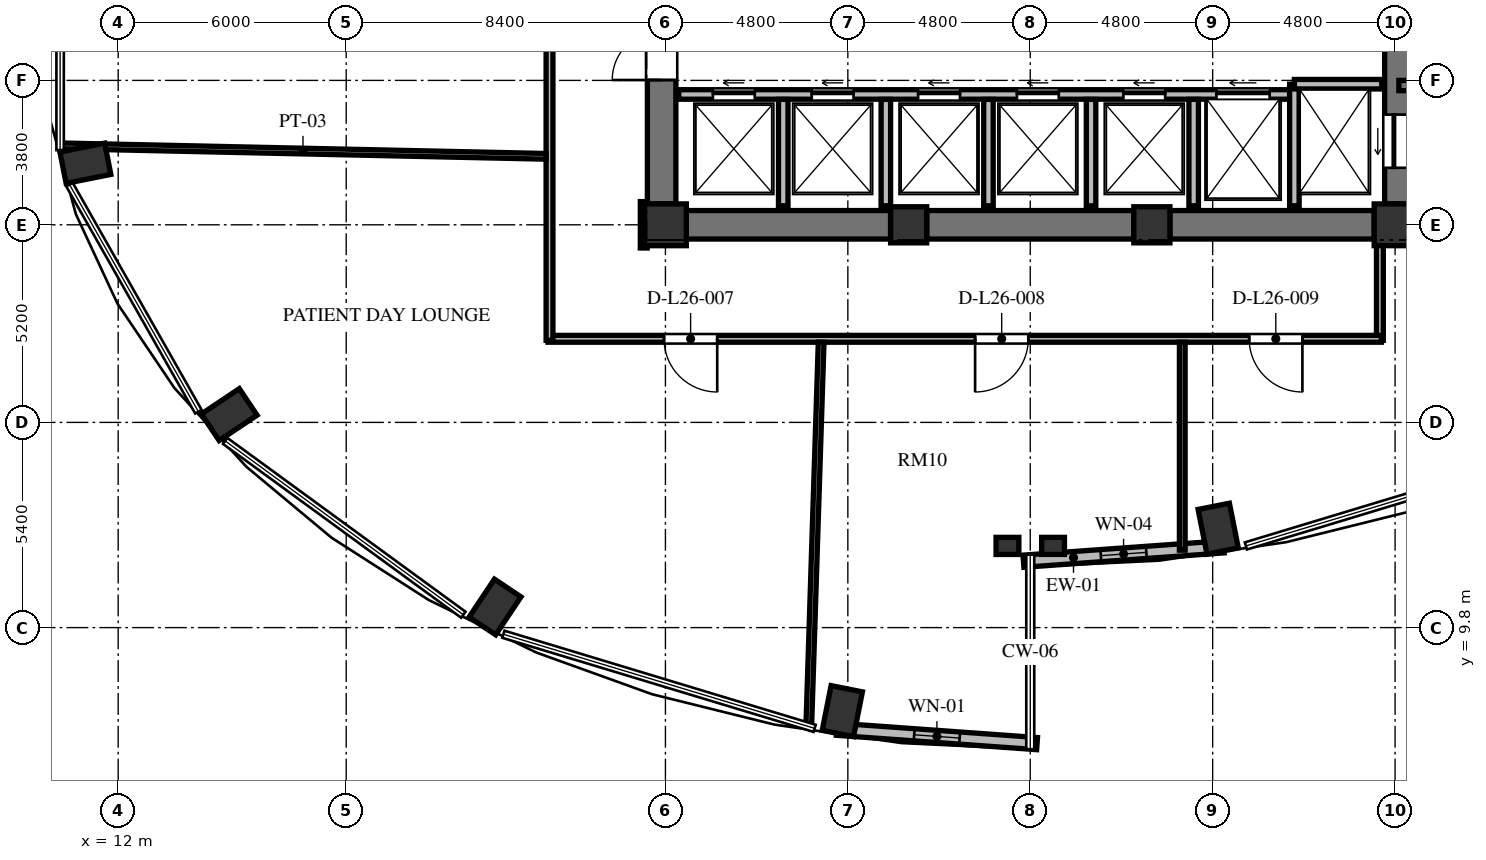
"""IFC4 building model, lengths in metres.
Left out: names, types, materials, properties, quantities, classifications, styles, units other than length and angle.
Written with IfcOpenShell. Run it as: python <this file> out.ifc"""

import sys

from ifc_helpers import new_model, si_unit, direction, frame, frame_2d, origin, origin_2d, place, context, subcontext, project, spatial, rectangle, extrude, element, fill, save


model = new_model("IFC4")
c1 = context("Model", 3, precision=1e-05, world=origin(), true_north=direction((0.0, 1.0)))
c2 = subcontext(c1, "Body", "Model", "MODEL_VIEW")
j1 = project(units=[si_unit("LENGTHUNIT", "METRE"), si_unit("PLANEANGLEUNIT", "RADIAN")], contexts=[c1])
p1 = place(None, origin())
s1 = spatial("IfcSite", under=j1, at=p1, CompositionType="ELEMENT")
p2 = place(p1, origin())
s2 = spatial("IfcBuilding", under=s1, at=p2, CompositionType="ELEMENT")
p3 = place(p2, frame((0.0, 0.0, 103.632)))
s3 = spatial("IfcBuildingStorey", under=s2, at=p3, CompositionType="ELEMENT", Elevation=103.632)
for number, where, z_axis, x_axis in (
    (1, (40.946, 12.403, 0.0), (0.0, 0.0, 1.0), (0.195, -0.981, 0.0)),
    (2, (11.137, 22.02, 0.0), (0.0, 0.0, 1.0), (-0.981, -0.195, 0.0)),
    (3, (14.922, 15.405, 0.0), (0.0, 0.0, 1.0), (-0.831, -0.556, 0.0)),
    (4, (21.916, 10.343, 0.0), (0.0, 0.0, 1.0), (-0.556, -0.831, 0.0)),
    (5, (31.054, 7.603, 0.0), (0.0, 0.0, 1.0), (-0.195, -0.981, 0.0)),
):
    element("IfcColumn", number, at=place(p3, frame(where, z_axis=z_axis, x_axis=x_axis)), inside=s3, PredefinedType="COLUMN", context=c2, shape_type="SweptSolid", body=[
        extrude(rectangle(XDim=1.2, YDim=0.84, at=origin_2d()), origin(), (0.0, 0.0, 1.0), 3.648),
    ])
p4 = place(p3, frame((26.4, 20.4, 0.0), z_axis=(0.0, 0.0, 1.0), x_axis=(1.0, 0.0, 0.0)))
e6 = element("IfcColumn", 6, at=p4, inside=s3, PredefinedType="COLUMN", context=c2, shape_type="SweptSolid", body=[
    extrude(rectangle(XDim=1.1, YDim=1.1, at=origin_2d()), origin(), (0.0, 0.0, 1.0), 3.648),
])
for number, where, z_axis, x_axis in (
    (7, (32.8, 20.4, 0.0), (0.0, 0.0, 1.0), (1.0, 0.0, 0.0)),
    (8, (39.2, 20.4, 0.0), (0.0, 0.0, 1.0), (1.0, 0.0, 0.0)),
):
    element("IfcColumn", number, at=place(p3, frame(where, z_axis=z_axis, x_axis=x_axis)), inside=s3, PredefinedType="COLUMN", context=c2, shape_type="SweptSolid", body=[
        extrude(rectangle(XDim=0.95, YDim=0.95, at=origin_2d()), origin(), (0.0, 0.0, 1.0), 3.648),
    ])
p5 = place(p3, frame((45.6, 20.4, 0.0), z_axis=(0.0, 0.0, 1.0), x_axis=(1.0, 0.0, 0.0)))
e9 = element("IfcColumn", 9, at=p5, inside=s3, PredefinedType="COLUMN", context=c2, shape_type="SweptSolid", body=[
    extrude(rectangle(XDim=1.1, YDim=1.1, at=origin_2d()), origin(), (0.0, 0.0, 1.0), 3.648),
])
for number, where, z_axis, x_axis in (
    (10, (35.4, 11.95, 0.0), (0.0, 0.0, 1.0), (1.0, 0.0, 0.0)),
    (11, (36.6, 11.95, 0.0), (0.0, 0.0, 1.0), (1.0, 0.0, 0.0)),
):
    element("IfcColumn", number, at=place(p3, frame(where, z_axis=z_axis, x_axis=x_axis)), inside=s3, PredefinedType="PILASTER", context=c2, shape_type="SweptSolid", body=[
        extrude(rectangle(XDim=0.6, YDim=0.45, at=origin_2d()), origin(), (0.0, 0.0, 1.0), 3.648),
    ])
p6 = place(p3, frame((26.3, 20.95, 0.0), z_axis=(0.0, 0.0, 1.0), x_axis=(0.0, 1.0, 0.0)))
e12 = element("IfcWall", 12, at=p6, inside=s3, PredefinedType="SHEAR", context=c2, shape_type="SweptSolid", body=[
    extrude(rectangle(XDim=14.1, YDim=0.75, at=frame_2d((7.05, 0.0))), origin(), (0.0, 0.0, 1.0), 3.648),
])
p7 = place(p6, frame((6.5, 0.0, 0.0)))
e13 = element("IfcOpeningElement", 13, at=p7, cuts=e12, PredefinedType="OPENING", context=c2, shape_type="SweptSolid", body=[
    extrude(rectangle(XDim=1.2, YDim=2.15, at=frame_2d((0.6, 1.075))), frame((0.0, 0.385, 0.0), z_axis=(0.0, -1.0, 0.0), x_axis=(1.0, 0.0, 0.0)), (0.0, 0.0, 1.0), 0.77),
])
p8 = place(p6, frame((9.6, 0.0, 0.0)))
e14 = element("IfcOpeningElement", 14, at=p8, cuts=e12, PredefinedType="OPENING", context=c2, shape_type="SweptSolid", body=[
    extrude(rectangle(XDim=1.3, YDim=2.2, at=frame_2d((0.65, 1.1))), frame((0.0, 0.385, 0.0), z_axis=(0.0, -1.0, 0.0), x_axis=(1.0, 0.0, 0.0)), (0.0, 0.0, 1.0), 0.77),
])
p9 = place(p6, frame((3.26, 0.0, 0.0)))
e15 = element("IfcOpeningElement", 15, at=p9, cuts=e12, PredefinedType="OPENING", context=c2, shape_type="SweptSolid", body=[
    extrude(rectangle(XDim=1.3, YDim=2.2, at=frame_2d((0.65, 1.1))), frame((0.0, 0.385, 0.0), z_axis=(0.0, -1.0, 0.0), x_axis=(1.0, 0.0, 0.0)), (0.0, 0.0, 1.0), 0.77),
])
p10 = place(p3, frame((45.7, 20.95, 0.0), z_axis=(0.0, 0.0, 1.0), x_axis=(0.0, 1.0, 0.0)))
e16 = element("IfcWall", 16, at=p10, inside=s3, PredefinedType="SHEAR", context=c2, shape_type="SweptSolid", body=[
    extrude(rectangle(XDim=14.1, YDim=0.75, at=frame_2d((7.05, 0.0))), origin(), (0.0, 0.0, 1.0), 3.648),
])
p11 = place(p10, frame((11.75, 0.0, 0.0)))
e17 = element("IfcOpeningElement", 17, at=p11, cuts=e16, PredefinedType="OPENING", context=c2, shape_type="SweptSolid", body=[
    extrude(rectangle(XDim=1.4, YDim=2.3, at=frame_2d((0.7, 1.15))), frame((0.0, 0.385, 0.0), z_axis=(0.0, -1.0, 0.0), x_axis=(1.0, 0.0, 0.0)), (0.0, 0.0, 1.0), 0.77),
])
p12 = place(p10, frame((0.95, 0.0, 0.0)))
e18 = element("IfcOpeningElement", 18, at=p12, cuts=e16, PredefinedType="OPENING", context=c2, shape_type="SweptSolid", body=[
    extrude(rectangle(XDim=1.4, YDim=2.3, at=frame_2d((0.7, 1.15))), frame((0.0, 0.385, 0.0), z_axis=(0.0, -1.0, 0.0), x_axis=(1.0, 0.0, 0.0)), (0.0, 0.0, 1.0), 0.77),
])
p13 = place(p3, frame((26.95, 20.4, 0.0), z_axis=(0.0, 0.0, 1.0), x_axis=(1.0, 0.0, 0.0)))
e19 = element("IfcWall", 19, at=p13, inside=s3, PredefinedType="SHEAR", context=c2, shape_type="SweptSolid", body=[
    extrude(rectangle(XDim=5.375, YDim=0.75, at=frame_2d((2.688, 0.0))), origin(), (0.0, 0.0, 1.0), 3.648),
])
p14 = place(p3, frame((33.275, 20.4, 0.0), z_axis=(0.0, 0.0, 1.0), x_axis=(1.0, 0.0, 0.0)))
e20 = element("IfcWall", 20, at=p14, inside=s3, PredefinedType="SHEAR", context=c2, shape_type="SweptSolid", body=[
    extrude(rectangle(XDim=5.45, YDim=0.75, at=frame_2d((2.725, 0.0))), origin(), (0.0, 0.0, 1.0), 3.648),
])
p15 = place(p3, frame((39.675, 20.4, 0.0), z_axis=(0.0, 0.0, 1.0), x_axis=(1.0, 0.0, 0.0)))
e21 = element("IfcWall", 21, at=p15, inside=s3, PredefinedType="SHEAR", context=c2, shape_type="SweptSolid", body=[
    extrude(rectangle(XDim=5.375, YDim=0.75, at=frame_2d((2.688, 0.0))), origin(), (0.0, 0.0, 1.0), 3.648),
])
p16 = place(p3, frame((35.821, 11.547, 0.0), z_axis=(0.0, 0.0, 1.0), x_axis=(0.997432364291, 0.071614793619, 0.0)))
e22 = element("IfcWall", 22, at=p16, inside=s3, PredefinedType="SOLIDWALL", context=c2, shape_type="SweptSolid", body=[
    extrude(rectangle(XDim=5.284, YDim=0.32, at=frame_2d((2.642, 0.0))), origin(), (0.0, 0.0, 1.0), 3.428),
])
p17 = place(p16, frame((2.042, 0.0, 0.85)))
e23 = element("IfcOpeningElement", 23, at=p17, cuts=e22, PredefinedType="OPENING", context=c2, shape_type="SweptSolid", body=[
    extrude(rectangle(XDim=1.2, YDim=1.8, at=frame_2d((0.6, 0.9))), frame((0.0, 0.17, 0.0), z_axis=(0.0, -1.0, 0.0), x_axis=(1.0, 0.0, 0.0)), (0.0, 0.0, 1.0), 0.34),
])
p18 = place(p3, frame((30.909, 7.125, 0.0), z_axis=(0.0, 0.0, 1.0), x_axis=(0.997431890304, -0.071621394884, 0.0)))
e24 = element("IfcWall", 24, at=p18, inside=s3, PredefinedType="SOLIDWALL", context=c2, shape_type="SweptSolid", body=[
    extrude(rectangle(XDim=5.284, YDim=0.32, at=frame_2d((2.642, 0.0))), origin(), (0.0, 0.0, 1.0), 3.428),
])
p19 = place(p18, frame((2.042, 0.0, 0.85)))
e25 = element("IfcOpeningElement", 25, at=p19, cuts=e24, PredefinedType="OPENING", context=c2, shape_type="SweptSolid", body=[
    extrude(rectangle(XDim=1.2, YDim=2.2, at=frame_2d((0.6, 1.1))), frame((0.0, 0.17, 0.0), z_axis=(0.0, -1.0, 0.0), x_axis=(1.0, 0.0, 0.0)), (0.0, 0.0, 1.0), 0.34),
])
p20 = place(p3, frame((26.75, 23.83, 0.0), z_axis=(0.0, 0.0, 1.0), x_axis=(1.0, 0.0, 0.0)))
e26 = element("IfcWall", 26, at=p20, inside=s3, PredefinedType="SOLIDWALL", context=c2, shape_type="SweptSolid", body=[
    extrude(rectangle(XDim=16.2, YDim=0.25, at=frame_2d((8.1, 0.0))), origin(), (0.0, 0.0, 1.0), 3.428),
])
p21 = place(p20, frame((0.9, 0.0, 0.0)))
e27 = element("IfcOpeningElement", 27, at=p21, cuts=e26, PredefinedType="OPENING", context=c2, shape_type="SweptSolid", body=[
    extrude(rectangle(XDim=1.1, YDim=2.2, at=frame_2d((0.55, 1.1))), frame((0.0, 0.135, 0.0), z_axis=(0.0, -1.0, 0.0), x_axis=(1.0, 0.0, 0.0)), (0.0, 0.0, 1.0), 0.27),
])
p22 = place(p20, frame((3.5, 0.0, 0.0)))
e28 = element("IfcOpeningElement", 28, at=p22, cuts=e26, PredefinedType="OPENING", context=c2, shape_type="SweptSolid", body=[
    extrude(rectangle(XDim=1.1, YDim=2.2, at=frame_2d((0.55, 1.1))), frame((0.0, 0.135, 0.0), z_axis=(0.0, -1.0, 0.0), x_axis=(1.0, 0.0, 0.0)), (0.0, 0.0, 1.0), 0.27),
])
p23 = place(p20, frame((6.3, 0.0, 0.0)))
e29 = element("IfcOpeningElement", 29, at=p23, cuts=e26, PredefinedType="OPENING", context=c2, shape_type="SweptSolid", body=[
    extrude(rectangle(XDim=1.1, YDim=2.2, at=frame_2d((0.55, 1.1))), frame((0.0, 0.135, 0.0), z_axis=(0.0, -1.0, 0.0), x_axis=(1.0, 0.0, 0.0)), (0.0, 0.0, 1.0), 0.27),
])
p24 = place(p20, frame((8.9, 0.0, 0.0)))
e30 = element("IfcOpeningElement", 30, at=p24, cuts=e26, PredefinedType="OPENING", context=c2, shape_type="SweptSolid", body=[
    extrude(rectangle(XDim=1.1, YDim=2.2, at=frame_2d((0.55, 1.1))), frame((0.0, 0.135, 0.0), z_axis=(0.0, -1.0, 0.0), x_axis=(1.0, 0.0, 0.0)), (0.0, 0.0, 1.0), 0.27),
])
p25 = place(p20, frame((11.7, 0.0, 0.0)))
e31 = element("IfcOpeningElement", 31, at=p25, cuts=e26, PredefinedType="OPENING", context=c2, shape_type="SweptSolid", body=[
    extrude(rectangle(XDim=1.1, YDim=2.2, at=frame_2d((0.55, 1.1))), frame((0.0, 0.135, 0.0), z_axis=(0.0, -1.0, 0.0), x_axis=(1.0, 0.0, 0.0)), (0.0, 0.0, 1.0), 0.27),
])
p26 = place(p20, frame((14.15, 0.0, 0.0)))
e32 = element("IfcOpeningElement", 32, at=p26, cuts=e26, PredefinedType="OPENING", context=c2, shape_type="SweptSolid", body=[
    extrude(rectangle(XDim=1.4, YDim=2.3, at=frame_2d((0.7, 1.15))), frame((0.0, 0.135, 0.0), z_axis=(0.0, -1.0, 0.0), x_axis=(1.0, 0.0, 0.0)), (0.0, 0.0, 1.0), 0.27),
])
p27 = place(p3, frame((42.95, 20.9, 0.0), z_axis=(0.0, 0.0, 1.0), x_axis=(0.0, 1.0, 0.0)))
e33 = element("IfcWall", 33, at=p27, inside=s3, PredefinedType="SOLIDWALL", context=c2, shape_type="SweptSolid", body=[
    extrude(rectangle(XDim=3.2, YDim=0.25, at=frame_2d((1.6, 0.0))), origin(), (0.0, 0.0, 1.0), 3.428),
])
p28 = place(p3, frame((42.95, 24.1, 0.0), z_axis=(0.0, 0.0, 1.0), x_axis=(1.0, 0.0, 0.0)))
e34 = element("IfcWall", 34, at=p28, inside=s3, PredefinedType="SOLIDWALL", context=c2, shape_type="SweptSolid", body=[
    extrude(rectangle(XDim=2.3, YDim=0.25, at=frame_2d((1.15, 0.0))), origin(), (0.0, 0.0, 1.0), 3.428),
])
for number, where, z_axis, x_axis in (
    (35, (29.5, 20.9, 0.0), (0.0, 0.0, 1.0), (0.0, 1.0, 0.0)),
    (36, (32.2, 20.9, 0.0), (0.0, 0.0, 1.0), (0.0, 1.0, 0.0)),
    (37, (34.9, 20.9, 0.0), (0.0, 0.0, 1.0), (0.0, 1.0, 0.0)),
    (38, (37.6, 20.9, 0.0), (0.0, 0.0, 1.0), (0.0, 1.0, 0.0)),
    (39, (40.3, 20.9, 0.0), (0.0, 0.0, 1.0), (0.0, 1.0, 0.0)),
):
    element("IfcWall", number, at=place(p3, frame(where, z_axis=z_axis, x_axis=x_axis)), inside=s3, PredefinedType="SOLIDWALL", context=c2, shape_type="SweptSolid", body=[
        extrude(rectangle(XDim=2.8, YDim=0.25, at=frame_2d((1.4, 0.0))), origin(), (0.0, 0.0, 1.0), 3.428),
    ])
p29 = place(p3, frame((45.7, 24.065, 0.0), z_axis=(0.0, 0.0, 1.0), x_axis=(1.0, 0.0, 0.0)))
e40 = element("IfcWall", 40, at=p29, inside=s3, PredefinedType="SHEAR", context=c2, shape_type="SweptSolid", body=[
    extrude(rectangle(XDim=4.715, YDim=0.27, at=frame_2d((2.357, 0.0))), origin(), (0.0, 0.0, 1.0), 3.648),
])
p30 = place(p3, frame((45.7, 20.02, 0.0), z_axis=(0.0, 0.0, 1.0), x_axis=(1.0, 0.0, 0.0)))
e41 = element("IfcWall", 41, at=p30, inside=s3, PredefinedType="SOLIDWALL", context=c2, shape_type="SweptSolid", body=[
    extrude(rectangle(XDim=4.715, YDim=0.25, at=frame_2d((2.357, 0.0))), origin(), (0.0, 0.0, 1.0), 3.428),
])
p31 = place(p3, frame((25.83, 21.01, 0.0), z_axis=(0.0, 0.0, 1.0), x_axis=(0.0, -1.0, 0.0)))
e42 = element("IfcWall", 42, at=p31, inside=s3, PredefinedType="PARTITIONING", context=c2, shape_type="SweptSolid", body=[
    extrude(rectangle(XDim=1.22, YDim=0.18, at=frame_2d((0.61, 0.0))), origin(), (0.0, 0.0, 1.0), 3.428),
])
p32 = place(p3, frame((45.2, 19.91, 0.0), z_axis=(0.0, 0.0, 1.0), x_axis=(0.0, -1.0, 0.0)))
e43 = element("IfcWall", 43, at=p32, inside=s3, PredefinedType="PARTITIONING", context=c2, shape_type="SweptSolid", body=[
    extrude(rectangle(XDim=2.55, YDim=0.18, at=frame_2d((1.275, 0.0))), origin(), (0.0, 0.0, 1.0), 3.428),
])
p33 = place(p3, frame((45.24, 17.4, 0.0), z_axis=(0.0, 0.0, 1.0), x_axis=(-1.0, 0.0, 0.0)))
e44 = element("IfcWall", 44, at=p33, inside=s3, PredefinedType="PARTITIONING", context=c2, shape_type="SweptSolid", body=[
    extrude(rectangle(XDim=21.93, YDim=0.18, at=frame_2d((10.965, 0.0))), origin(), (0.0, 0.0, 1.0), 3.053),
])
p34 = place(p33, frame((17.477, 0.0, 0.0)))
e45 = element("IfcOpeningElement", 45, at=p34, cuts=e44, PredefinedType="OPENING", context=c2, shape_type="SweptSolid", body=[
    extrude(rectangle(XDim=1.4, YDim=2.2, at=frame_2d((0.7, 1.1))), frame((0.0, 0.1, 0.0), z_axis=(0.0, -1.0, 0.0), x_axis=(1.0, 0.0, 0.0)), (0.0, 0.0, 1.0), 0.2),
])
p35 = place(p33, frame((9.291, 0.0, 0.0)))
e46 = element("IfcOpeningElement", 46, at=p35, cuts=e44, PredefinedType="OPENING", context=c2, shape_type="SweptSolid", body=[
    extrude(rectangle(XDim=1.4, YDim=2.2, at=frame_2d((0.7, 1.1))), frame((0.0, 0.1, 0.0), z_axis=(0.0, -1.0, 0.0), x_axis=(1.0, 0.0, 0.0)), (0.0, 0.0, 1.0), 0.2),
])
p36 = place(p33, frame((2.079, 0.0, 0.0)))
e47 = element("IfcOpeningElement", 47, at=p36, cuts=e44, PredefinedType="OPENING", context=c2, shape_type="SweptSolid", body=[
    extrude(rectangle(XDim=1.4, YDim=2.2, at=frame_2d((0.7, 1.1))), frame((0.0, 0.1, 0.0), z_axis=(0.0, -1.0, 0.0), x_axis=(1.0, 0.0, 0.0)), (0.0, 0.0, 1.0), 0.2),
])
p37 = place(p3, frame((23.35, 17.36, 0.0), z_axis=(0.0, 0.0, 1.0), x_axis=(0.0, 1.0, 0.0)))
e48 = element("IfcWall", 48, at=p37, inside=s3, PredefinedType="PARTITIONING", context=c2, shape_type="SweptSolid", body=[
    extrude(rectangle(XDim=9.28, YDim=0.18, at=frame_2d((4.64, 0.0))), origin(), (0.0, 0.0, 1.0), 3.428),
])
p38 = place(p3, frame((10.465, 22.479, 0.0), z_axis=(0.0, 0.0, 1.0), x_axis=(0.999765147572, -0.021671402821, 0.0)))
e49 = element("IfcWall", 49, at=p38, inside=s3, PredefinedType="PARTITIONING", context=c2, shape_type="SweptSolid", body=[
    extrude(rectangle(XDim=12.798, YDim=0.15, at=frame_2d((6.399, 0.0))), origin(), (0.0, 0.0, 1.0), 3.428),
])
p39 = place(p3, frame((30.171, 7.195, 0.0), z_axis=(0.0, 0.0, 1.0), x_axis=(0.03222807912, 0.999480540539, 0.0)))
e50 = element("IfcWall", 50, at=p39, inside=s3, PredefinedType="PARTITIONING", context=c2, shape_type="SweptSolid", body=[
    extrude(rectangle(XDim=10.121, YDim=0.15, at=frame_2d((5.061, 0.0))), origin(), (0.0, 0.0, 1.0), 3.428),
])
p40 = place(p3, frame((40.0, 11.837, 0.0), z_axis=(0.0, 0.0, 1.0), x_axis=(0.0, 1.0, 0.0)))
e51 = element("IfcWall", 51, at=p40, inside=s3, PredefinedType="PARTITIONING", context=c2, shape_type="SweptSolid", body=[
    extrude(rectangle(XDim=5.473, YDim=0.15, at=frame_2d((2.736, 0.0))), origin(), (0.0, 0.0, 1.0), 2.813),
])
p41 = place(p17, origin())
e52 = element("IfcWindow", 52, at=p41, inside=s3, PartitioningType="SINGLE_PANEL", PredefinedType="WINDOW", context=c2, shape_type="SweptSolid", body=[
    extrude(rectangle(XDim=1.2, YDim=1.8, at=frame_2d((0.6, 0.9))), frame((0.0, 0.03, 0.0), z_axis=(0.0, -1.0, 0.0), x_axis=(1.0, 0.0, 0.0)), (0.0, 0.0, 1.0), 0.06),
])
fill(e23, e52)
p42 = place(p19, origin())
e53 = element("IfcWindow", 53, at=p42, inside=s3, PartitioningType="SINGLE_PANEL", PredefinedType="WINDOW", context=c2, shape_type="SweptSolid", body=[
    extrude(rectangle(XDim=1.2, YDim=2.2, at=frame_2d((0.6, 1.1))), frame((0.0, 0.03, 0.0), z_axis=(0.0, -1.0, 0.0), x_axis=(1.0, 0.0, 0.0)), (0.0, 0.0, 1.0), 0.06),
])
fill(e25, e53)
p43 = place(p9, origin())
e54 = element("IfcDoor", 54, at=p43, inside=s3, OperationType="SINGLE_SWING_LEFT", PredefinedType="DOOR", context=c2, shape_type="SweptSolid", body=[
    extrude(rectangle(XDim=1.3, YDim=2.2, at=frame_2d((0.65, 1.1))), frame((0.0, 0.025, 0.0), z_axis=(0.0, -1.0, 0.0), x_axis=(1.0, 0.0, 0.0)), (0.0, 0.0, 1.0), 0.05),
])
fill(e15, e54)
p44 = place(p21, origin())
e55 = element("IfcDoor", 55, at=p44, inside=s3, OperationType="SLIDING_TO_LEFT", PredefinedType="DOOR", context=c2, shape_type="SweptSolid", body=[
    extrude(rectangle(XDim=1.1, YDim=2.2, at=frame_2d((0.55, 1.1))), frame((0.0, 0.025, 0.0), z_axis=(0.0, -1.0, 0.0), x_axis=(1.0, 0.0, 0.0)), (0.0, 0.0, 1.0), 0.05),
])
fill(e27, e55)
p45 = place(p22, origin())
e56 = element("IfcDoor", 56, at=p45, inside=s3, OperationType="SLIDING_TO_LEFT", PredefinedType="DOOR", context=c2, shape_type="SweptSolid", body=[
    extrude(rectangle(XDim=1.1, YDim=2.2, at=frame_2d((0.55, 1.1))), frame((0.0, 0.025, 0.0), z_axis=(0.0, -1.0, 0.0), x_axis=(1.0, 0.0, 0.0)), (0.0, 0.0, 1.0), 0.05),
])
fill(e28, e56)
p46 = place(p23, origin())
e57 = element("IfcDoor", 57, at=p46, inside=s3, OperationType="SLIDING_TO_LEFT", PredefinedType="DOOR", context=c2, shape_type="SweptSolid", body=[
    extrude(rectangle(XDim=1.1, YDim=2.2, at=frame_2d((0.55, 1.1))), frame((0.0, 0.025, 0.0), z_axis=(0.0, -1.0, 0.0), x_axis=(1.0, 0.0, 0.0)), (0.0, 0.0, 1.0), 0.05),
])
fill(e29, e57)
p47 = place(p24, origin())
e58 = element("IfcDoor", 58, at=p47, inside=s3, OperationType="SLIDING_TO_LEFT", PredefinedType="DOOR", context=c2, shape_type="SweptSolid", body=[
    extrude(rectangle(XDim=1.1, YDim=2.2, at=frame_2d((0.55, 1.1))), frame((0.0, 0.025, 0.0), z_axis=(0.0, -1.0, 0.0), x_axis=(1.0, 0.0, 0.0)), (0.0, 0.0, 1.0), 0.05),
])
fill(e30, e58)
p48 = place(p25, origin())
e59 = element("IfcDoor", 59, at=p48, inside=s3, OperationType="SLIDING_TO_LEFT", PredefinedType="DOOR", context=c2, shape_type="SweptSolid", body=[
    extrude(rectangle(XDim=1.1, YDim=2.2, at=frame_2d((0.55, 1.1))), frame((0.0, 0.025, 0.0), z_axis=(0.0, -1.0, 0.0), x_axis=(1.0, 0.0, 0.0)), (0.0, 0.0, 1.0), 0.05),
])
fill(e31, e59)
p49 = place(p12, origin())
e60 = element("IfcDoor", 60, at=p49, inside=s3, OperationType="SLIDING_TO_LEFT", PredefinedType="DOOR", context=c2, shape_type="SweptSolid", body=[
    extrude(rectangle(XDim=1.4, YDim=2.3, at=frame_2d((0.7, 1.15))), frame((0.0, 0.025, 0.0), z_axis=(0.0, -1.0, 0.0), x_axis=(1.0, 0.0, 0.0)), (0.0, 0.0, 1.0), 0.05),
])
fill(e18, e60)
p50 = place(p26, origin())
e61 = element("IfcDoor", 61, at=p50, inside=s3, OperationType="SLIDING_TO_LEFT", PredefinedType="DOOR", context=c2, shape_type="SweptSolid", body=[
    extrude(rectangle(XDim=1.4, YDim=2.3, at=frame_2d((0.7, 1.15))), frame((0.0, 0.025, 0.0), z_axis=(0.0, -1.0, 0.0), x_axis=(1.0, 0.0, 0.0)), (0.0, 0.0, 1.0), 0.05),
])
fill(e32, e61)
p51 = place(p34, origin())
e62 = element("IfcDoor", 62, at=p51, inside=s3, OperationType="SINGLE_SWING_LEFT", PredefinedType="DOOR", context=c2, shape_type="SweptSolid", body=[
    extrude(rectangle(XDim=1.4, YDim=2.2, at=frame_2d((0.7, 1.1))), frame((0.0, 0.025, 0.0), z_axis=(0.0, -1.0, 0.0), x_axis=(1.0, 0.0, 0.0)), (0.0, 0.0, 1.0), 0.05),
])
fill(e45, e62)
p52 = place(p35, origin())
e63 = element("IfcDoor", 63, at=p52, inside=s3, OperationType="SINGLE_SWING_RIGHT", PredefinedType="DOOR", context=c2, shape_type="SweptSolid", body=[
    extrude(rectangle(XDim=1.4, YDim=2.2, at=frame_2d((0.7, 1.1))), frame((0.0, 0.025, 0.0), z_axis=(0.0, -1.0, 0.0), x_axis=(1.0, 0.0, 0.0)), (0.0, 0.0, 1.0), 0.05),
])
fill(e46, e63)
p53 = place(p36, origin())
e64 = element("IfcDoor", 64, at=p53, inside=s3, OperationType="SINGLE_SWING_LEFT", PredefinedType="DOOR", context=c2, shape_type="SweptSolid", body=[
    extrude(rectangle(XDim=1.4, YDim=2.2, at=frame_2d((0.7, 1.1))), frame((0.0, 0.025, 0.0), z_axis=(0.0, -1.0, 0.0), x_axis=(1.0, 0.0, 0.0)), (0.0, 0.0, 1.0), 0.05),
])
fill(e47, e64)
save(model, sys.argv[1])
